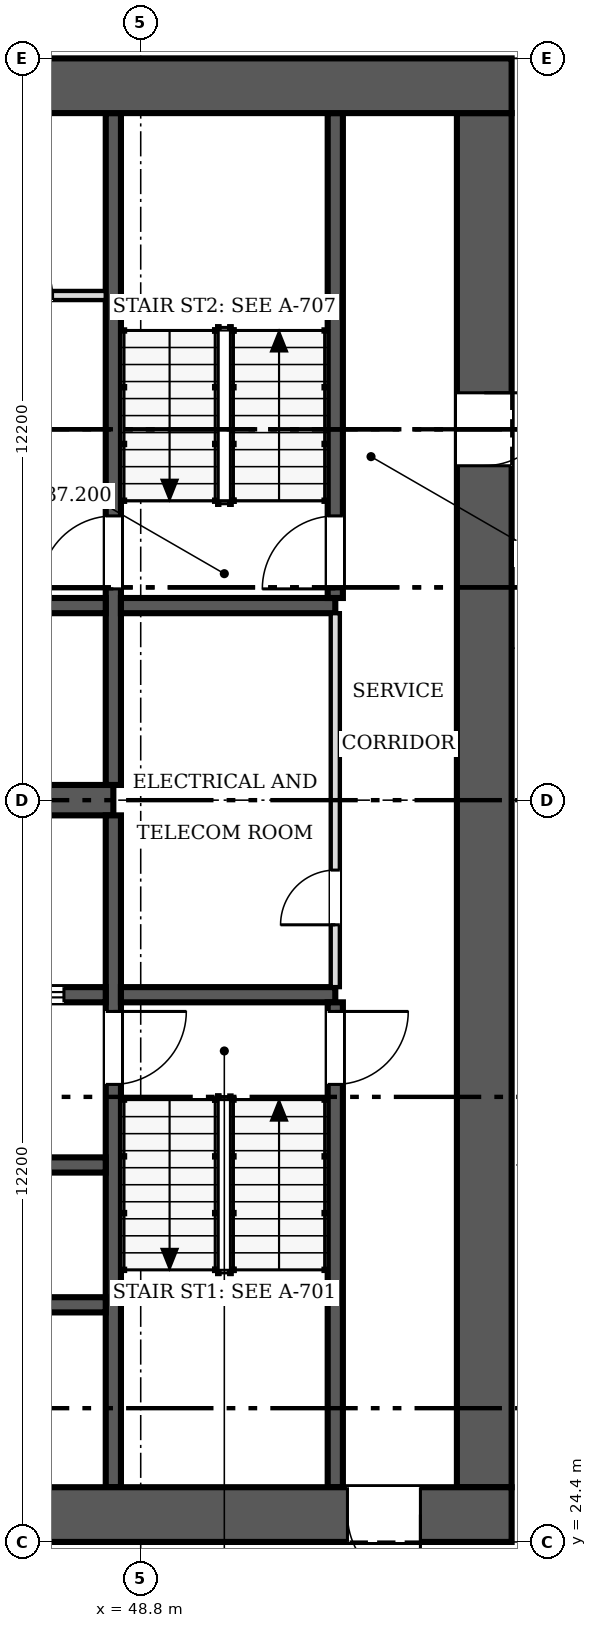
"""IFC4 building model, lengths in metres.
Left out: names, types, materials, properties, quantities, classifications, styles, units other than length and angle.
Written with IfcOpenShell. Run it as: python <this file> out.ifc"""

import sys

from ifc_helpers import new_model, si_unit, direction, frame, frame_2d, origin, place, context, subcontext, project, spatial, rectangle, extrude, source, transform, mapped, element, fill, save


model = new_model("IFC4")
c1 = context("Model", 3, precision=1e-05, world=origin(), true_north=direction((0.0, 1.0)))
c2 = subcontext(c1, "Body", "Model", "MODEL_VIEW")
j1 = project(units=[si_unit("LENGTHUNIT", "METRE"), si_unit("PLANEANGLEUNIT", "RADIAN")], contexts=[c1])
p1 = place(None, origin())
s1 = spatial("IfcSite", under=j1, at=p1, CompositionType="ELEMENT")
p2 = place(p1, origin())
s2 = spatial("IfcBuilding", under=s1, at=p2, CompositionType="ELEMENT")
p3 = place(p2, frame((0.0, 0.0, 37.2)))
s3 = spatial("IfcBuildingStorey", under=s2, at=p3, CompositionType="ELEMENT", Elevation=37.2)
p4 = place(p3, frame((54.9, 24.85, 0.0), z_axis=(0.0, 0.0, 1.0), x_axis=(-1.0, 0.0, 0.0)))
e1 = element("IfcWall", 1, at=p4, inside=s3, PredefinedType="SHEAR", context=c2, shape_type="SweptSolid", body=[
    extrude(rectangle(XDim=24.4, YDim=0.9, at=frame_2d((12.2, 0.0))), origin(), (0.0, 0.0, 1.0), 3.8),
])
m1 = source(origin(), c2, "Body", "SweptSolid", [
    extrude(rectangle(XDim=1.2, YDim=2.1, at=frame_2d((0.6, 1.05))), frame((0.0, 0.46, 0.0), z_axis=(0.0, -1.0, 0.0), x_axis=(1.0, 0.0, 0.0)), (0.0, 0.0, 1.0), 0.92),
])
p5 = place(p4, frame((1.5, 0.0, 0.0)))
e2 = element("IfcOpeningElement", 2, at=p5, cuts=e1, PredefinedType="OPENING", context=c2, shape_type="MappedRepresentation", body=[
    mapped(m1, transform((0.0, 0.0, 0.0), scale=1.0)),
])
p6 = place(p3, frame((30.5, 48.35, 0.0), z_axis=(0.0, 0.0, 1.0), x_axis=(1.0, 0.0, 0.0)))
e3 = element("IfcWall", 3, at=p6, inside=s3, PredefinedType="SHEAR", context=c2, shape_type="SweptSolid", body=[
    extrude(rectangle(XDim=24.4, YDim=0.9, at=frame_2d((12.2, 0.0))), origin(), (0.0, 0.0, 1.0), 3.8),
])
p7 = place(p3, frame((54.45, 47.9, 0.0), z_axis=(0.0, 0.0, 1.0), x_axis=(0.0, -1.0, 0.0)))
e4 = element("IfcWall", 4, at=p7, inside=s3, PredefinedType="SHEAR", context=c2, shape_type="SweptSolid", body=[
    extrude(rectangle(XDim=22.6, YDim=0.9, at=frame_2d((11.3, 0.0))), origin(), (0.0, 0.0, 1.0), 3.8),
])
p8 = place(p7, frame((4.6, 0.0, 0.0)))
e5 = element("IfcOpeningElement", 5, at=p8, cuts=e4, PredefinedType="OPENING", context=c2, shape_type="MappedRepresentation", body=[
    mapped(m1, transform((0.0, 0.0, 0.0), scale=1.0)),
])
p9 = place(p3, frame((31.4, 36.6, 0.0), z_axis=(0.0, 0.0, 1.0), x_axis=(1.0, 0.0, 0.0)))
e6 = element("IfcWall", 6, at=p9, inside=s3, PredefinedType="SHEAR", context=c2, shape_type="SweptSolid", body=[
    extrude(rectangle(XDim=16.95, YDim=0.5, at=frame_2d((8.475, 0.0))), origin(), (0.0, 0.0, 1.0), 3.8),
])
p10 = place(p3, frame((48.35, 36.35, 0.0), z_axis=(0.0, 0.0, 1.0), x_axis=(0.0, -1.0, 0.0)))
e7 = element("IfcWall", 7, at=p10, inside=s3, PredefinedType="SOLIDWALL", context=c2, shape_type="SweptSolid", body=[
    extrude(rectangle(XDim=11.05, YDim=0.25, at=frame_2d((5.525, 0.0))), origin(), (0.0, 0.0, 1.0), 3.8),
])
m2 = source(origin(), c2, "Body", "SweptSolid", [
    extrude(rectangle(XDim=1.2, YDim=2.1, at=frame_2d((0.6, 1.05))), frame((0.0, 0.135, 0.0), z_axis=(0.0, -1.0, 0.0), x_axis=(1.0, 0.0, 0.0)), (0.0, 0.0, 1.0), 0.27),
])
p11 = place(p10, frame((3.225, 0.0, 0.0)))
e8 = element("IfcOpeningElement", 8, at=p11, cuts=e7, PredefinedType="OPENING", context=c2, shape_type="MappedRepresentation", body=[
    mapped(m2, transform((0.0, 0.0, 0.0), scale=1.0)),
])
p12 = place(p3, frame((48.35, 47.9, 0.0), z_axis=(0.0, 0.0, 1.0), x_axis=(0.0, -1.0, 0.0)))
e9 = element("IfcWall", 9, at=p12, inside=s3, PredefinedType="SOLIDWALL", context=c2, shape_type="SweptSolid", body=[
    extrude(rectangle(XDim=11.05, YDim=0.25, at=frame_2d((5.525, 0.0))), origin(), (0.0, 0.0, 1.0), 3.8),
])
p13 = place(p12, frame((6.625, 0.0, 0.0)))
e10 = element("IfcOpeningElement", 10, at=p13, cuts=e9, PredefinedType="OPENING", context=c2, shape_type="MappedRepresentation", body=[
    mapped(m2, transform((0.0, 0.0, 0.0), scale=1.0)),
])
p14 = place(p3, frame((48.225, 33.4, 0.0), z_axis=(0.0, 0.0, 1.0), x_axis=(-1.0, 0.0, 0.0)))
e11 = element("IfcWall", 11, at=p14, inside=s3, PredefinedType="SOLIDWALL", context=c2, shape_type="SweptSolid", body=[
    extrude(rectangle(XDim=5.275, YDim=0.25, at=frame_2d((2.638, 0.0))), origin(), (0.0, 0.0, 1.0), 3.8),
])
p15 = place(p14, frame((3.512, 0.0, 0.0)))
e12 = element("IfcOpeningElement", 12, at=p15, cuts=e11, PredefinedType="OPENING", context=c2, shape_type="MappedRepresentation", body=[
    mapped(m2, transform((0.0, 0.0, 0.0), scale=1.0)),
])
p16 = place(p14, frame((0.688, 0.0, 0.0)))
e13 = element("IfcOpeningElement", 13, at=p16, cuts=e11, PredefinedType="OPENING", context=c2, shape_type="MappedRepresentation", body=[
    mapped(m2, transform((0.0, 0.0, 0.0), scale=1.0)),
])
p17 = place(p3, frame((48.475, 33.4, 0.0), z_axis=(0.0, 0.0, 1.0), x_axis=(1.0, 0.0, 0.0)))
e14 = element("IfcWall", 14, at=p17, inside=s3, PredefinedType="SOLIDWALL", context=c2, shape_type="SweptSolid", body=[
    extrude(rectangle(XDim=3.525, YDim=0.25, at=frame_2d((1.762, 0.0))), origin(), (0.0, 0.0, 1.0), 3.8),
])
for number, where, z_axis, x_axis in (
    (15, (42.95, 28.3, 0.0), (0.0, 0.0, 1.0), (1.0, 0.0, 0.0)),
    (16, (42.95, 39.8, 0.0), (0.0, 0.0, 1.0), (1.0, 0.0, 0.0)),
):
    element("IfcWall", number, at=place(p3, frame(where, z_axis=z_axis, x_axis=x_axis)), inside=s3, PredefinedType="SOLIDWALL", context=c2, shape_type="SweptSolid", body=[
        extrude(rectangle(XDim=5.275, YDim=0.25, at=frame_2d((2.638, 0.0))), origin(), (0.0, 0.0, 1.0), 3.8),
    ])
p18 = place(p3, frame((48.475, 39.8, 0.0), z_axis=(0.0, 0.0, 1.0), x_axis=(1.0, 0.0, 0.0)))
e17 = element("IfcWall", 17, at=p18, inside=s3, PredefinedType="SOLIDWALL", context=c2, shape_type="SweptSolid", body=[
    extrude(rectangle(XDim=3.525, YDim=0.25, at=frame_2d((1.762, 0.0))), origin(), (0.0, 0.0, 1.0), 3.8),
])
p19 = place(p3, frame((52.0, 25.3, 0.0), z_axis=(0.0, 0.0, 1.0), x_axis=(0.0, 1.0, 0.0)))
e18 = element("IfcWall", 18, at=p19, inside=s3, PredefinedType="SOLIDWALL", context=c2, shape_type="SweptSolid", body=[
    extrude(rectangle(XDim=7.975, YDim=0.25, at=frame_2d((3.987, 0.0))), origin(), (0.0, 0.0, 1.0), 3.8),
])
p20 = place(p19, frame((6.625, 0.0, 0.0)))
e19 = element("IfcOpeningElement", 19, at=p20, cuts=e18, PredefinedType="OPENING", context=c2, shape_type="MappedRepresentation", body=[
    mapped(m2, transform((0.0, 0.0, 0.0), scale=1.0)),
])
p21 = place(p3, frame((52.0, 39.925, 0.0), z_axis=(0.0, 0.0, 1.0), x_axis=(0.0, 1.0, 0.0)))
e20 = element("IfcWall", 20, at=p21, inside=s3, PredefinedType="SOLIDWALL", context=c2, shape_type="SweptSolid", body=[
    extrude(rectangle(XDim=7.975, YDim=0.25, at=frame_2d((3.987, 0.0))), origin(), (0.0, 0.0, 1.0), 3.8),
])
p22 = place(p21, frame((0.15, 0.0, 0.0)))
e21 = element("IfcOpeningElement", 21, at=p22, cuts=e20, PredefinedType="OPENING", context=c2, shape_type="MappedRepresentation", body=[
    mapped(m2, transform((0.0, 0.0, 0.0), scale=1.0)),
])
p23 = place(p3, frame((42.95, 30.6, 0.0), z_axis=(0.0, 0.0, 1.0), x_axis=(1.0, 0.0, 0.0)))
e22 = element("IfcWall", 22, at=p23, inside=s3, PredefinedType="SOLIDWALL", context=c2, shape_type="SweptSolid", body=[
    extrude(rectangle(XDim=5.275, YDim=0.25, at=frame_2d((2.638, 0.0))), origin(), (0.0, 0.0, 1.0), 3.8),
])
p24 = place(p3, frame((52.0, 33.525, 0.0), z_axis=(0.0, 0.0, 1.0), x_axis=(0.0, 1.0, 0.0)))
e23 = element("IfcWall", 23, at=p24, inside=s3, PredefinedType="PARTITIONING", context=c2, shape_type="SweptSolid", body=[
    extrude(rectangle(XDim=6.15, YDim=0.15, at=frame_2d((3.075, 0.0))), origin(), (0.0, 0.0, 1.0), 3.6),
])
m3 = source(origin(), c2, "Body", "SweptSolid", [
    extrude(rectangle(XDim=0.9, YDim=2.1, at=frame_2d((0.45, 1.05))), frame((0.0, 0.085, 0.0), z_axis=(0.0, -1.0, 0.0), x_axis=(1.0, 0.0, 0.0)), (0.0, 0.0, 1.0), 0.17),
])
p25 = place(p24, frame((1.025, 0.0, 0.0)))
e24 = element("IfcOpeningElement", 24, at=p25, cuts=e23, PredefinedType="OPENING", context=c2, shape_type="MappedRepresentation", body=[
    mapped(m3, transform((0.0, 0.0, 0.0), scale=1.0)),
])
p26 = place(p3, frame((45.65, 44.9, 0.0), z_axis=(0.0, 0.0, 1.0), x_axis=(1.0, 0.0, 0.0)))
e25 = element("IfcWall", 25, at=p26, inside=s3, PredefinedType="PARTITIONING", context=c2, shape_type="SweptSolid", body=[
    extrude(rectangle(XDim=2.575, YDim=0.15, at=frame_2d((1.288, 0.0))), origin(), (0.0, 0.0, 1.0), 3.6),
])
p27 = place(p26, frame((0.8, 0.0, 0.0)))
e26 = element("IfcOpeningElement", 26, at=p27, cuts=e25, PredefinedType="OPENING", context=c2, shape_type="MappedRepresentation", body=[
    mapped(m3, transform((0.0, 0.0, 0.0), scale=1.0)),
])
m4 = source(origin(), c2, "Body", "SweptSolid", [
    extrude(rectangle(XDim=1.2, YDim=2.1, at=frame_2d((0.6, 1.05))), frame((0.0, 0.025, 0.0), z_axis=(0.0, -1.0, 0.0), x_axis=(1.0, 0.0, 0.0)), (0.0, 0.0, 1.0), 0.05),
])
p28 = place(p5, origin())
e27 = element("IfcDoor", 27, at=p28, inside=s3, OperationType="SINGLE_SWING_LEFT", PredefinedType="DOOR", context=c2, shape_type="MappedRepresentation", body=[
    mapped(m4, transform((0.0, 0.0, 0.0), scale=1.0)),
])
fill(e2, e27)
p29 = place(p8, origin())
e28 = element("IfcDoor", 28, at=p29, inside=s3, OperationType="SINGLE_SWING_LEFT", PredefinedType="DOOR", context=c2, shape_type="MappedRepresentation", body=[
    mapped(m4, transform((0.0, 0.0, 0.0), scale=1.0)),
])
fill(e5, e28)
p30 = place(p11, origin())
e29 = element("IfcDoor", 29, at=p30, inside=s3, OperationType="SINGLE_SWING_LEFT", PredefinedType="DOOR", context=c2, shape_type="MappedRepresentation", body=[
    mapped(m4, transform((0.0, 0.0, 0.0), scale=1.0)),
])
fill(e8, e29)
p31 = place(p13, origin())
e30 = element("IfcDoor", 30, at=p31, inside=s3, OperationType="SINGLE_SWING_RIGHT", PredefinedType="DOOR", context=c2, shape_type="MappedRepresentation", body=[
    mapped(m4, transform((0.0, 0.0, 0.0), scale=1.0)),
])
fill(e10, e30)
p32 = place(p16, origin())
e31 = element("IfcDoor", 31, at=p32, inside=s3, OperationType="DOUBLE_DOOR_SLIDING", PredefinedType="DOOR", context=c2, shape_type="MappedRepresentation", body=[
    mapped(m4, transform((0.0, 0.0, 0.0), scale=1.0)),
])
fill(e13, e31)
p33 = place(p20, origin())
e32 = element("IfcDoor", 32, at=p33, inside=s3, OperationType="SINGLE_SWING_RIGHT", PredefinedType="DOOR", context=c2, shape_type="MappedRepresentation", body=[
    mapped(m4, transform((0.0, 0.0, 0.0), scale=1.0)),
])
fill(e19, e32)
p34 = place(p22, origin())
e33 = element("IfcDoor", 33, at=p34, inside=s3, OperationType="SINGLE_SWING_LEFT", PredefinedType="DOOR", context=c2, shape_type="MappedRepresentation", body=[
    mapped(m4, transform((0.0, 0.0, 0.0), scale=1.0)),
])
fill(e21, e33)
m5 = source(origin(), c2, "Body", "SweptSolid", [
    extrude(rectangle(XDim=0.9, YDim=2.1, at=frame_2d((0.45, 1.05))), frame((0.0, 0.025, 0.0), z_axis=(0.0, -1.0, 0.0), x_axis=(1.0, 0.0, 0.0)), (0.0, 0.0, 1.0), 0.05),
])
p35 = place(p25, origin())
e34 = element("IfcDoor", 34, at=p35, inside=s3, OperationType="SINGLE_SWING_LEFT", PredefinedType="DOOR", context=c2, shape_type="MappedRepresentation", body=[
    mapped(m5, transform((0.0, 0.0, 0.0), scale=1.0)),
])
fill(e24, e34)
save(model, sys.argv[1])
